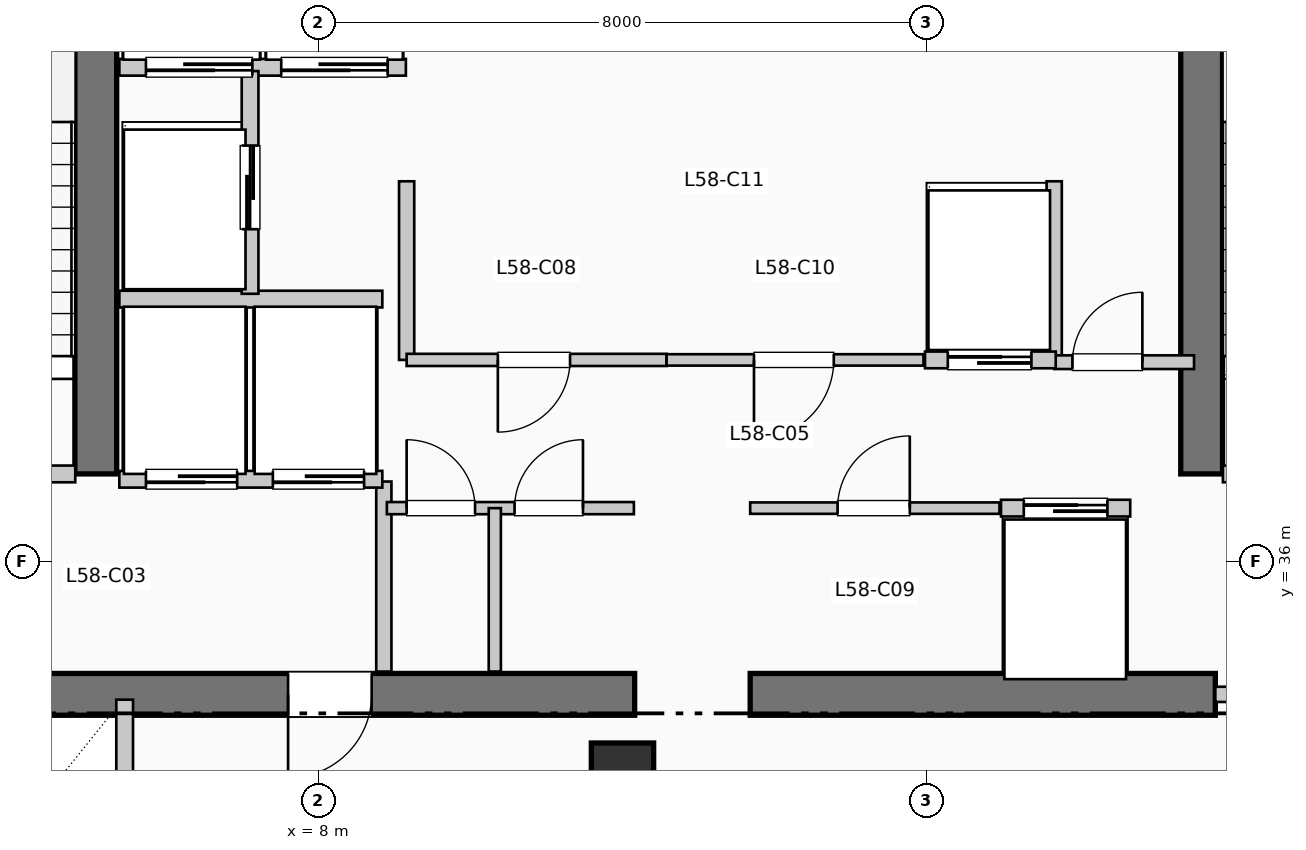
"""IFC4 building model, lengths in metres.
Left out: names, types, materials, properties, quantities, classifications, styles, units other than length and angle.
Written with IfcOpenShell. Run it as: python <this file> out.ifc"""

import sys

from ifc_helpers import new_model, si_unit, direction, frame, frame_2d, origin, origin_2d, place, context, subcontext, project, spatial, rectangle, extrude, element, fill, save


model = new_model("IFC4")
c1 = context("Model", 3, precision=1e-05, world=origin(), true_north=direction((0.0, 1.0)))
c2 = subcontext(c1, "Body", "Model", "MODEL_VIEW")
j1 = project(units=[si_unit("LENGTHUNIT", "METRE"), si_unit("PLANEANGLEUNIT", "RADIAN")], contexts=[c1])
p1 = place(None, origin())
s1 = spatial("IfcSite", under=j1, at=p1, CompositionType="ELEMENT")
p2 = place(p1, origin())
s2 = spatial("IfcBuilding", under=s1, at=p2, CompositionType="ELEMENT")
p3 = place(p2, frame((0.0, 0.0, 239.58)))
s3 = spatial("IfcBuildingStorey", under=s2, at=p3, CompositionType="ELEMENT", Elevation=239.58)
p4 = place(p3, frame((1.45, 34.25, 0.0), z_axis=(0.0, 0.0, 1.0), x_axis=(1.0, 0.0, 0.0)))
e1 = element("IfcWall", 1, at=p4, inside=s3, PredefinedType="SHEAR", context=c2, shape_type="SweptSolid", body=[
    extrude(rectangle(XDim=10.71, YDim=0.55, at=frame_2d((5.355, 0.0))), origin(), (0.0, 0.0, 1.0), 3.96),
])
p5 = place(p4, frame((7.25, 0.0, 0.0), z_axis=(0.0, 0.0, 1.0), x_axis=(-1.0, 0.0, 0.0)))
e2 = element("IfcOpeningElement", 2, at=p5, cuts=e1, PredefinedType="OPENING", context=c2, shape_type="SweptSolid", body=[
    extrude(rectangle(XDim=1.1, YDim=2.15, at=frame_2d((0.55, 1.075))), frame((0.0, 0.285, 0.0), z_axis=(0.0, -1.0, 0.0), x_axis=(1.0, 0.0, 0.0)), (0.0, 0.0, 1.0), 0.57),
])
p6 = place(p3, frame((13.68, 34.25, 0.0), z_axis=(0.0, 0.0, 1.0), x_axis=(1.0, 0.0, 0.0)))
e3 = element("IfcWall", 3, at=p6, inside=s3, PredefinedType="SHEAR", context=c2, shape_type="SweptSolid", body=[
    extrude(rectangle(XDim=6.12, YDim=0.55, at=frame_2d((3.06, 0.0))), origin(), (0.0, 0.0, 1.0), 3.96),
])
for number, where, z_axis, x_axis in (
    (4, (5.07, 37.15, 0.0), (0.0, 0.0, 1.0), (0.0, 1.0, 0.0)),
    (5, (19.62, 37.15, 0.0), (0.0, 0.0, 1.0), (0.0, 1.0, 0.0)),
):
    element("IfcWall", number, at=place(p3, frame(where, z_axis=z_axis, x_axis=x_axis)), inside=s3, PredefinedType="SHEAR", context=c2, shape_type="SweptSolid", body=[
        extrude(rectangle(XDim=7.89, YDim=0.55, at=frame_2d((3.945, 0.0))), origin(), (0.0, 0.0, 1.0), 3.96),
    ])
p7 = place(p3, frame((12.0, 33.2, 0.0), z_axis=(0.0, 0.0, 1.0), x_axis=(1.0, 0.0, 0.0)))
e6 = element("IfcColumn", 6, at=p7, inside=s3, PredefinedType="COLUMN", context=c2, shape_type="SweptSolid", body=[
    extrude(rectangle(XDim=0.82, YDim=0.82, at=origin_2d()), origin(), (0.0, 0.0, 1.0), 3.96),
])
p8 = place(p3, frame((1.65, 37.15, 0.0), z_axis=(0.0, 0.0, 1.0), x_axis=(1.0, 0.0, 0.0)))
e7 = element("IfcWall", 7, at=p8, inside=s3, PredefinedType="PARTITIONING", context=c2, shape_type="SweptSolid", body=[
    extrude(rectangle(XDim=3.15, YDim=0.22, at=frame_2d((1.575, 0.0))), origin(), (0.0, 0.0, 1.0), 3.71),
])
p9 = place(p8, frame((2.05, 0.0, 0.0), z_axis=(0.0, 0.0, 1.0), x_axis=(-1.0, 0.0, 0.0)))
e8 = element("IfcOpeningElement", 8, at=p9, cuts=e7, PredefinedType="OPENING", context=c2, shape_type="SweptSolid", body=[
    extrude(rectangle(XDim=1.05, YDim=2.15, at=frame_2d((0.525, 1.075))), frame((0.0, 0.12, 0.0), z_axis=(0.0, -1.0, 0.0), x_axis=(1.0, 0.0, 0.0)), (0.0, 0.0, 1.0), 0.24),
])
p10 = place(p3, frame((8.86, 34.55, 0.0), z_axis=(0.0, 0.0, 1.0), x_axis=(0.0, 1.0, 0.0)))
e9 = element("IfcWall", 9, at=p10, inside=s3, PredefinedType="PARTITIONING", context=c2, shape_type="SweptSolid", body=[
    extrude(rectangle(XDim=2.5, YDim=0.2, at=frame_2d((1.25, 0.0))), origin(), (0.0, 0.0, 1.0), 3.71),
])
p11 = place(p3, frame((19.9, 37.15, 0.0), z_axis=(0.0, 0.0, 1.0), x_axis=(1.0, 0.0, 0.0)))
e10 = element("IfcWall", 10, at=p11, inside=s3, PredefinedType="PARTITIONING", context=c2, shape_type="SweptSolid", body=[
    extrude(rectangle(XDim=3.15, YDim=0.22, at=frame_2d((1.575, 0.0))), origin(), (0.0, 0.0, 1.0), 3.71),
])
p12 = place(p11, frame((2.05, 0.0, 0.0), z_axis=(0.0, 0.0, 1.0), x_axis=(-1.0, 0.0, 0.0)))
e11 = element("IfcOpeningElement", 11, at=p12, cuts=e10, PredefinedType="OPENING", context=c2, shape_type="SweptSolid", body=[
    extrude(rectangle(XDim=1.05, YDim=2.15, at=frame_2d((0.525, 1.075))), frame((0.0, 0.12, 0.0), z_axis=(0.0, -1.0, 0.0), x_axis=(1.0, 0.0, 0.0)), (0.0, 0.0, 1.0), 0.24),
])
p13 = place(p3, frame((19.8, 34.25, 0.0), z_axis=(0.0, 0.0, 1.0), x_axis=(1.0, 0.0, 0.0)))
e12 = element("IfcWall", 12, at=p13, inside=s3, PredefinedType="PARTITIONING", context=c2, shape_type="SweptSolid", body=[
    extrude(rectangle(XDim=3.25, YDim=0.2, at=frame_2d((1.625, 0.0))), origin(), (0.0, 0.0, 1.0), 3.71),
])
p14 = place(p13, frame((2.15, 0.0, 0.0), z_axis=(0.0, 0.0, 1.0), x_axis=(-1.0, 0.0, 0.0)))
e13 = element("IfcOpeningElement", 13, at=p14, cuts=e12, PredefinedType="OPENING", context=c2, shape_type="SweptSolid", body=[
    extrude(rectangle(XDim=1.1, YDim=2.15, at=frame_2d((0.55, 1.075))), frame((0.0, 0.11, 0.0), z_axis=(0.0, -1.0, 0.0), x_axis=(1.0, 0.0, 0.0)), (0.0, 0.0, 1.0), 0.22),
])
p15 = place(p3, frame((5.38, 37.08, 0.0), z_axis=(0.0, 0.0, 1.0), x_axis=(1.0, 0.0, 0.0)))
e14 = element("IfcWall", 14, at=p15, inside=s3, PredefinedType="PARTITIONING", context=c2, shape_type="SweptSolid", body=[
    extrude(rectangle(XDim=3.46, YDim=0.22, at=frame_2d((1.73, 0.0))), origin(), (0.0, 0.0, 1.0), 3.71),
])
p16 = place(p15, frame((1.55, 0.0, 0.0), z_axis=(0.0, 0.0, 1.0), x_axis=(-1.0, 0.0, 0.0)))
e15 = element("IfcOpeningElement", 15, at=p16, cuts=e14, PredefinedType="OPENING", context=c2, shape_type="SweptSolid", body=[
    extrude(rectangle(XDim=1.2, YDim=2.2, at=frame_2d((0.6, 1.1))), frame((0.0, 0.12, 0.0), z_axis=(0.0, -1.0, 0.0), x_axis=(1.0, 0.0, 0.0)), (0.0, 0.0, 1.0), 0.24),
])
p17 = place(p15, frame((3.22, 0.0, 0.0), z_axis=(0.0, 0.0, 1.0), x_axis=(-1.0, 0.0, 0.0)))
e16 = element("IfcOpeningElement", 16, at=p17, cuts=e14, PredefinedType="OPENING", context=c2, shape_type="SweptSolid", body=[
    extrude(rectangle(XDim=1.2, YDim=2.2, at=frame_2d((0.6, 1.1))), frame((0.0, 0.12, 0.0), z_axis=(0.0, -1.0, 0.0), x_axis=(1.0, 0.0, 0.0)), (0.0, 0.0, 1.0), 0.24),
])
p18 = place(p3, frame((5.38, 39.45, 0.0), z_axis=(0.0, 0.0, 1.0), x_axis=(1.0, 0.0, 0.0)))
e17 = element("IfcWall", 17, at=p18, inside=s3, PredefinedType="PARTITIONING", context=c2, shape_type="SweptSolid", body=[
    extrude(rectangle(XDim=3.46, YDim=0.22, at=frame_2d((1.73, 0.0))), origin(), (0.0, 0.0, 1.0), 3.71),
])
p19 = place(p3, frame((5.38, 42.5, 0.0), z_axis=(0.0, 0.0, 1.0), x_axis=(1.0, 0.0, 0.0)))
e18 = element("IfcWall", 18, at=p19, inside=s3, PredefinedType="PARTITIONING", context=c2, shape_type="SweptSolid", body=[
    extrude(rectangle(XDim=3.77, YDim=0.22, at=frame_2d((1.885, 0.0))), origin(), (0.0, 0.0, 1.0), 3.71),
])
p20 = place(p19, frame((1.75, 0.0, 0.0), z_axis=(0.0, 0.0, 1.0), x_axis=(-1.0, 0.0, 0.0)))
e19 = element("IfcOpeningElement", 19, at=p20, cuts=e18, PredefinedType="OPENING", context=c2, shape_type="SweptSolid", body=[
    extrude(rectangle(XDim=1.4, YDim=2.2, at=frame_2d((0.7, 1.1))), frame((0.0, 0.12, 0.0), z_axis=(0.0, -1.0, 0.0), x_axis=(1.0, 0.0, 0.0)), (0.0, 0.0, 1.0), 0.24),
])
p21 = place(p19, frame((3.53, 0.0, 0.0), z_axis=(0.0, 0.0, 1.0), x_axis=(-1.0, 0.0, 0.0)))
e20 = element("IfcOpeningElement", 20, at=p21, cuts=e18, PredefinedType="OPENING", context=c2, shape_type="SweptSolid", body=[
    extrude(rectangle(XDim=1.4, YDim=2.2, at=frame_2d((0.7, 1.1))), frame((0.0, 0.12, 0.0), z_axis=(0.0, -1.0, 0.0), x_axis=(1.0, 0.0, 0.0)), (0.0, 0.0, 1.0), 0.24),
])
p22 = place(p3, frame((7.1, 39.52, 0.0), z_axis=(0.0, 0.0, 1.0), x_axis=(0.0, 1.0, 0.0)))
e21 = element("IfcWall", 21, at=p22, inside=s3, PredefinedType="PARTITIONING", context=c2, shape_type="SweptSolid", body=[
    extrude(rectangle(XDim=2.93, YDim=0.22, at=frame_2d((1.465, 0.0))), origin(), (0.0, 0.0, 1.0), 3.71),
])
p23 = place(p22, frame((0.85, 0.0, 0.0)))
e22 = element("IfcOpeningElement", 22, at=p23, cuts=e21, PredefinedType="OPENING", context=c2, shape_type="SweptSolid", body=[
    extrude(rectangle(XDim=1.1, YDim=2.2, at=frame_2d((0.55, 1.1))), frame((0.0, 0.12, 0.0), z_axis=(0.0, -1.0, 0.0), x_axis=(1.0, 0.0, 0.0)), (0.0, 0.0, 1.0), 0.24),
])
p24 = place(p3, frame((5.45, 31.8, 0.0), z_axis=(0.0, 0.0, 1.0), x_axis=(0.0, 1.0, 0.0)))
e23 = element("IfcWall", 23, at=p24, inside=s3, PredefinedType="PARTITIONING", context=c2, shape_type="SweptSolid", body=[
    extrude(rectangle(XDim=2.38, YDim=0.22, at=frame_2d((1.19, 0.0))), origin(), (0.0, 0.0, 1.0), 3.71),
])
for number, where, z_axis, x_axis in (
    (24, (9.16, 38.65, 0.0), (0.0, 0.0, 1.0), (0.0, 1.0, 0.0)),
    (25, (17.68, 38.65, 0.0), (0.0, 0.0, 1.0), (0.0, 1.0, 0.0)),
):
    element("IfcWall", number, at=place(p3, frame(where, z_axis=z_axis, x_axis=x_axis)), inside=s3, PredefinedType="PARTITIONING", context=c2, shape_type="SweptSolid", body=[
        extrude(rectangle(XDim=2.35, YDim=0.2, at=frame_2d((1.175, 0.0))), origin(), (0.0, 0.0, 1.0), 3.71),
    ])
p25 = place(p3, frame((17.68, 38.62, 0.0), z_axis=(0.0, 0.0, 1.0), x_axis=(1.0, 0.0, 0.0)))
e26 = element("IfcWall", 26, at=p25, inside=s3, PredefinedType="PARTITIONING", context=c2, shape_type="SweptSolid", body=[
    extrude(rectangle(XDim=1.84, YDim=0.18, at=frame_2d((0.92, 0.0))), origin(), (0.0, 0.0, 1.0), 3.71),
])
p26 = place(p25, frame((0.24, 0.0, 0.0)))
e27 = element("IfcOpeningElement", 27, at=p26, cuts=e26, PredefinedType="OPENING", context=c2, shape_type="SweptSolid", body=[
    extrude(rectangle(XDim=0.92, YDim=2.1, at=frame_2d((0.46, 1.05))), frame((0.0, 0.1, 0.0), z_axis=(0.0, -1.0, 0.0), x_axis=(1.0, 0.0, 0.0)), (0.0, 0.0, 1.0), 0.2),
])
p27 = place(p3, frame((8.9, 36.7, 0.0), z_axis=(0.0, 0.0, 1.0), x_axis=(1.0, 0.0, 0.0)))
e28 = element("IfcWall", 28, at=p27, inside=s3, PredefinedType="PARTITIONING", context=c2, shape_type="SweptSolid", body=[
    extrude(rectangle(XDim=3.25, YDim=0.16, at=frame_2d((1.625, 0.0))), origin(), (0.0, 0.0, 1.0), 3.71),
])
p28 = place(p27, frame((0.26, 0.0, 0.0)))
e29 = element("IfcOpeningElement", 29, at=p28, cuts=e28, PredefinedType="OPENING", context=c2, shape_type="SweptSolid", body=[
    extrude(rectangle(XDim=0.9, YDim=2.15, at=frame_2d((0.45, 1.075))), frame((0.0, 0.09, 0.0), z_axis=(0.0, -1.0, 0.0), x_axis=(1.0, 0.0, 0.0)), (0.0, 0.0, 1.0), 0.18),
])
p29 = place(p27, frame((1.68, 0.0, 0.0)))
e30 = element("IfcOpeningElement", 30, at=p29, cuts=e28, PredefinedType="OPENING", context=c2, shape_type="SweptSolid", body=[
    extrude(rectangle(XDim=0.9, YDim=2.15, at=frame_2d((0.45, 1.075))), frame((0.0, 0.09, 0.0), z_axis=(0.0, -1.0, 0.0), x_axis=(1.0, 0.0, 0.0)), (0.0, 0.0, 1.0), 0.18),
])
p30 = place(p3, frame((10.32, 34.55, 0.0), z_axis=(0.0, 0.0, 1.0), x_axis=(0.0, 1.0, 0.0)))
e31 = element("IfcWall", 31, at=p30, inside=s3, PredefinedType="PARTITIONING", context=c2, shape_type="SweptSolid", body=[
    extrude(rectangle(XDim=2.15, YDim=0.16, at=frame_2d((1.075, 0.0))), origin(), (0.0, 0.0, 1.0), 3.71),
])
p31 = place(p3, frame((9.16, 38.65, 0.0), z_axis=(0.0, 0.0, 1.0), x_axis=(1.0, 0.0, 0.0)))
e32 = element("IfcWall", 32, at=p31, inside=s3, PredefinedType="PARTITIONING", context=c2, shape_type="SweptSolid", body=[
    extrude(rectangle(XDim=3.42, YDim=0.16, at=frame_2d((1.71, 0.0))), origin(), (0.0, 0.0, 1.0), 3.71),
])
p32 = place(p31, frame((2.15, 0.0, 0.0), z_axis=(0.0, 0.0, 1.0), x_axis=(-1.0, 0.0, 0.0)))
e33 = element("IfcOpeningElement", 33, at=p32, cuts=e32, PredefinedType="OPENING", context=c2, shape_type="SweptSolid", body=[
    extrude(rectangle(XDim=0.95, YDim=2.15, at=frame_2d((0.475, 1.075))), frame((0.0, 0.09, 0.0), z_axis=(0.0, -1.0, 0.0), x_axis=(1.0, 0.0, 0.0)), (0.0, 0.0, 1.0), 0.18),
])
p33 = place(p3, frame((13.68, 36.7, 0.0), z_axis=(0.0, 0.0, 1.0), x_axis=(1.0, 0.0, 0.0)))
e34 = element("IfcWall", 34, at=p33, inside=s3, PredefinedType="PARTITIONING", context=c2, shape_type="SweptSolid", body=[
    extrude(rectangle(XDim=3.28, YDim=0.15, at=frame_2d((1.64, 0.0))), origin(), (0.0, 0.0, 1.0), 3.71),
])
p34 = place(p33, frame((1.15, 0.0, 0.0)))
e35 = element("IfcOpeningElement", 35, at=p34, cuts=e34, PredefinedType="OPENING", context=c2, shape_type="SweptSolid", body=[
    extrude(rectangle(XDim=0.95, YDim=2.15, at=frame_2d((0.475, 1.075))), frame((0.0, 0.085, 0.0), z_axis=(0.0, -1.0, 0.0), x_axis=(1.0, 0.0, 0.0)), (0.0, 0.0, 1.0), 0.17),
])
p35 = place(p3, frame((12.58, 38.65, 0.0), z_axis=(0.0, 0.0, 1.0), x_axis=(1.0, 0.0, 0.0)))
e36 = element("IfcWall", 36, at=p35, inside=s3, PredefinedType="PARTITIONING", context=c2, shape_type="SweptSolid", body=[
    extrude(rectangle(XDim=3.38, YDim=0.15, at=frame_2d((1.69, 0.0))), origin(), (0.0, 0.0, 1.0), 3.71),
])
p36 = place(p35, frame((2.2, 0.0, 0.0), z_axis=(0.0, 0.0, 1.0), x_axis=(-1.0, 0.0, 0.0)))
e37 = element("IfcOpeningElement", 37, at=p36, cuts=e36, PredefinedType="OPENING", context=c2, shape_type="SweptSolid", body=[
    extrude(rectangle(XDim=1.05, YDim=2.15, at=frame_2d((0.525, 1.075))), frame((0.0, 0.085, 0.0), z_axis=(0.0, -1.0, 0.0), x_axis=(1.0, 0.0, 0.0)), (0.0, 0.0, 1.0), 0.17),
])
p37 = place(p3, frame((16.98, 36.7, 0.0), z_axis=(0.0, 0.0, 1.0), x_axis=(1.0, 0.0, 0.0)))
e38 = element("IfcWall", 38, at=p37, inside=s3, PredefinedType="PARTITIONING", context=c2, shape_type="SweptSolid", body=[
    extrude(rectangle(XDim=1.7, YDim=0.22, at=frame_2d((0.85, 0.0))), origin(), (0.0, 0.0, 1.0), 3.71),
])
p38 = place(p37, frame((0.3, 0.0, 0.0)))
e39 = element("IfcOpeningElement", 39, at=p38, cuts=e38, PredefinedType="OPENING", context=c2, shape_type="SweptSolid", body=[
    extrude(rectangle(XDim=1.1, YDim=2.2, at=frame_2d((0.55, 1.1))), frame((0.0, 0.12, 0.0), z_axis=(0.0, -1.0, 0.0), x_axis=(1.0, 0.0, 0.0)), (0.0, 0.0, 1.0), 0.24),
])
p39 = place(p3, frame((15.98, 38.65, 0.0), z_axis=(0.0, 0.0, 1.0), x_axis=(1.0, 0.0, 0.0)))
e40 = element("IfcWall", 40, at=p39, inside=s3, PredefinedType="PARTITIONING", context=c2, shape_type="SweptSolid", body=[
    extrude(rectangle(XDim=1.72, YDim=0.22, at=frame_2d((0.86, 0.0))), origin(), (0.0, 0.0, 1.0), 3.71),
])
p40 = place(p39, frame((0.3, 0.0, 0.0)))
e41 = element("IfcOpeningElement", 41, at=p40, cuts=e40, PredefinedType="OPENING", context=c2, shape_type="SweptSolid", body=[
    extrude(rectangle(XDim=1.1, YDim=2.2, at=frame_2d((0.55, 1.1))), frame((0.0, 0.12, 0.0), z_axis=(0.0, -1.0, 0.0), x_axis=(1.0, 0.0, 0.0)), (0.0, 0.0, 1.0), 0.24),
])
p41 = place(p5, origin())
e42 = element("IfcDoor", 42, at=p41, inside=s3, OperationType="SINGLE_SWING_LEFT", PredefinedType="DOOR", context=c2, shape_type="SweptSolid", body=[
    extrude(rectangle(XDim=1.1, YDim=2.15, at=frame_2d((0.55, 1.075))), frame((0.0, 0.025, 0.0), z_axis=(0.0, -1.0, 0.0), x_axis=(1.0, 0.0, 0.0)), (0.0, 0.0, 1.0), 0.05),
])
fill(e2, e42)
p42 = place(p16, origin())
e43 = element("IfcDoor", 43, at=p42, inside=s3, OperationType="SLIDING_TO_RIGHT", PredefinedType="DOOR", context=c2, shape_type="SweptSolid", body=[
    extrude(rectangle(XDim=1.2, YDim=2.2, at=frame_2d((0.6, 1.1))), frame((0.0, 0.025, 0.0), z_axis=(0.0, -1.0, 0.0), x_axis=(1.0, 0.0, 0.0)), (0.0, 0.0, 1.0), 0.05),
])
fill(e15, e43)
p43 = place(p17, origin())
e44 = element("IfcDoor", 44, at=p43, inside=s3, OperationType="SLIDING_TO_RIGHT", PredefinedType="DOOR", context=c2, shape_type="SweptSolid", body=[
    extrude(rectangle(XDim=1.2, YDim=2.2, at=frame_2d((0.6, 1.1))), frame((0.0, 0.025, 0.0), z_axis=(0.0, -1.0, 0.0), x_axis=(1.0, 0.0, 0.0)), (0.0, 0.0, 1.0), 0.05),
])
fill(e16, e44)
p44 = place(p20, origin())
e45 = element("IfcDoor", 45, at=p44, inside=s3, OperationType="SLIDING_TO_LEFT", PredefinedType="DOOR", context=c2, shape_type="SweptSolid", body=[
    extrude(rectangle(XDim=1.4, YDim=2.2, at=frame_2d((0.7, 1.1))), frame((0.0, 0.025, 0.0), z_axis=(0.0, -1.0, 0.0), x_axis=(1.0, 0.0, 0.0)), (0.0, 0.0, 1.0), 0.05),
])
fill(e19, e45)
p45 = place(p21, origin())
e46 = element("IfcDoor", 46, at=p45, inside=s3, OperationType="SLIDING_TO_LEFT", PredefinedType="DOOR", context=c2, shape_type="SweptSolid", body=[
    extrude(rectangle(XDim=1.4, YDim=2.2, at=frame_2d((0.7, 1.1))), frame((0.0, 0.025, 0.0), z_axis=(0.0, -1.0, 0.0), x_axis=(1.0, 0.0, 0.0)), (0.0, 0.0, 1.0), 0.05),
])
fill(e20, e46)
p46 = place(p23, origin())
e47 = element("IfcDoor", 47, at=p46, inside=s3, OperationType="SLIDING_TO_LEFT", PredefinedType="DOOR", context=c2, shape_type="SweptSolid", body=[
    extrude(rectangle(XDim=1.1, YDim=2.2, at=frame_2d((0.55, 1.1))), frame((0.0, 0.025, 0.0), z_axis=(0.0, -1.0, 0.0), x_axis=(1.0, 0.0, 0.0)), (0.0, 0.0, 1.0), 0.05),
])
fill(e22, e47)
p47 = place(p26, origin())
e48 = element("IfcDoor", 48, at=p47, inside=s3, OperationType="SINGLE_SWING_RIGHT", PredefinedType="DOOR", context=c2, shape_type="SweptSolid", body=[
    extrude(rectangle(XDim=0.92, YDim=2.1, at=frame_2d((0.46, 1.05))), frame((0.0, 0.025, 0.0), z_axis=(0.0, -1.0, 0.0), x_axis=(1.0, 0.0, 0.0)), (0.0, 0.0, 1.0), 0.05),
])
fill(e27, e48)
p48 = place(p28, origin())
e49 = element("IfcDoor", 49, at=p48, inside=s3, OperationType="SINGLE_SWING_LEFT", PredefinedType="DOOR", context=c2, shape_type="SweptSolid", body=[
    extrude(rectangle(XDim=0.9, YDim=2.15, at=frame_2d((0.45, 1.075))), frame((0.0, 0.025, 0.0), z_axis=(0.0, -1.0, 0.0), x_axis=(1.0, 0.0, 0.0)), (0.0, 0.0, 1.0), 0.05),
])
fill(e29, e49)
p49 = place(p29, origin())
e50 = element("IfcDoor", 50, at=p49, inside=s3, OperationType="SINGLE_SWING_RIGHT", PredefinedType="DOOR", context=c2, shape_type="SweptSolid", body=[
    extrude(rectangle(XDim=0.9, YDim=2.15, at=frame_2d((0.45, 1.075))), frame((0.0, 0.025, 0.0), z_axis=(0.0, -1.0, 0.0), x_axis=(1.0, 0.0, 0.0)), (0.0, 0.0, 1.0), 0.05),
])
fill(e30, e50)
p50 = place(p32, origin())
e51 = element("IfcDoor", 51, at=p50, inside=s3, OperationType="SINGLE_SWING_LEFT", PredefinedType="DOOR", context=c2, shape_type="SweptSolid", body=[
    extrude(rectangle(XDim=0.95, YDim=2.15, at=frame_2d((0.475, 1.075))), frame((0.0, 0.025, 0.0), z_axis=(0.0, -1.0, 0.0), x_axis=(1.0, 0.0, 0.0)), (0.0, 0.0, 1.0), 0.05),
])
fill(e33, e51)
p51 = place(p34, origin())
e52 = element("IfcDoor", 52, at=p51, inside=s3, OperationType="SINGLE_SWING_RIGHT", PredefinedType="DOOR", context=c2, shape_type="SweptSolid", body=[
    extrude(rectangle(XDim=0.95, YDim=2.15, at=frame_2d((0.475, 1.075))), frame((0.0, 0.025, 0.0), z_axis=(0.0, -1.0, 0.0), x_axis=(1.0, 0.0, 0.0)), (0.0, 0.0, 1.0), 0.05),
])
fill(e35, e52)
p52 = place(p36, origin())
e53 = element("IfcDoor", 53, at=p52, inside=s3, OperationType="SINGLE_SWING_LEFT", PredefinedType="DOOR", context=c2, shape_type="SweptSolid", body=[
    extrude(rectangle(XDim=1.05, YDim=2.15, at=frame_2d((0.525, 1.075))), frame((0.0, 0.025, 0.0), z_axis=(0.0, -1.0, 0.0), x_axis=(1.0, 0.0, 0.0)), (0.0, 0.0, 1.0), 0.05),
])
fill(e37, e53)
p53 = place(p38, origin())
e54 = element("IfcDoor", 54, at=p53, inside=s3, OperationType="SLIDING_TO_LEFT", PredefinedType="DOOR", context=c2, shape_type="SweptSolid", body=[
    extrude(rectangle(XDim=1.1, YDim=2.2, at=frame_2d((0.55, 1.1))), frame((0.0, 0.025, 0.0), z_axis=(0.0, -1.0, 0.0), x_axis=(1.0, 0.0, 0.0)), (0.0, 0.0, 1.0), 0.05),
])
fill(e39, e54)
p54 = place(p40, origin())
e55 = element("IfcDoor", 55, at=p54, inside=s3, OperationType="SLIDING_TO_LEFT", PredefinedType="DOOR", context=c2, shape_type="SweptSolid", body=[
    extrude(rectangle(XDim=1.1, YDim=2.2, at=frame_2d((0.55, 1.1))), frame((0.0, 0.025, 0.0), z_axis=(0.0, -1.0, 0.0), x_axis=(1.0, 0.0, 0.0)), (0.0, 0.0, 1.0), 0.05),
])
fill(e41, e55)
save(model, sys.argv[1])
